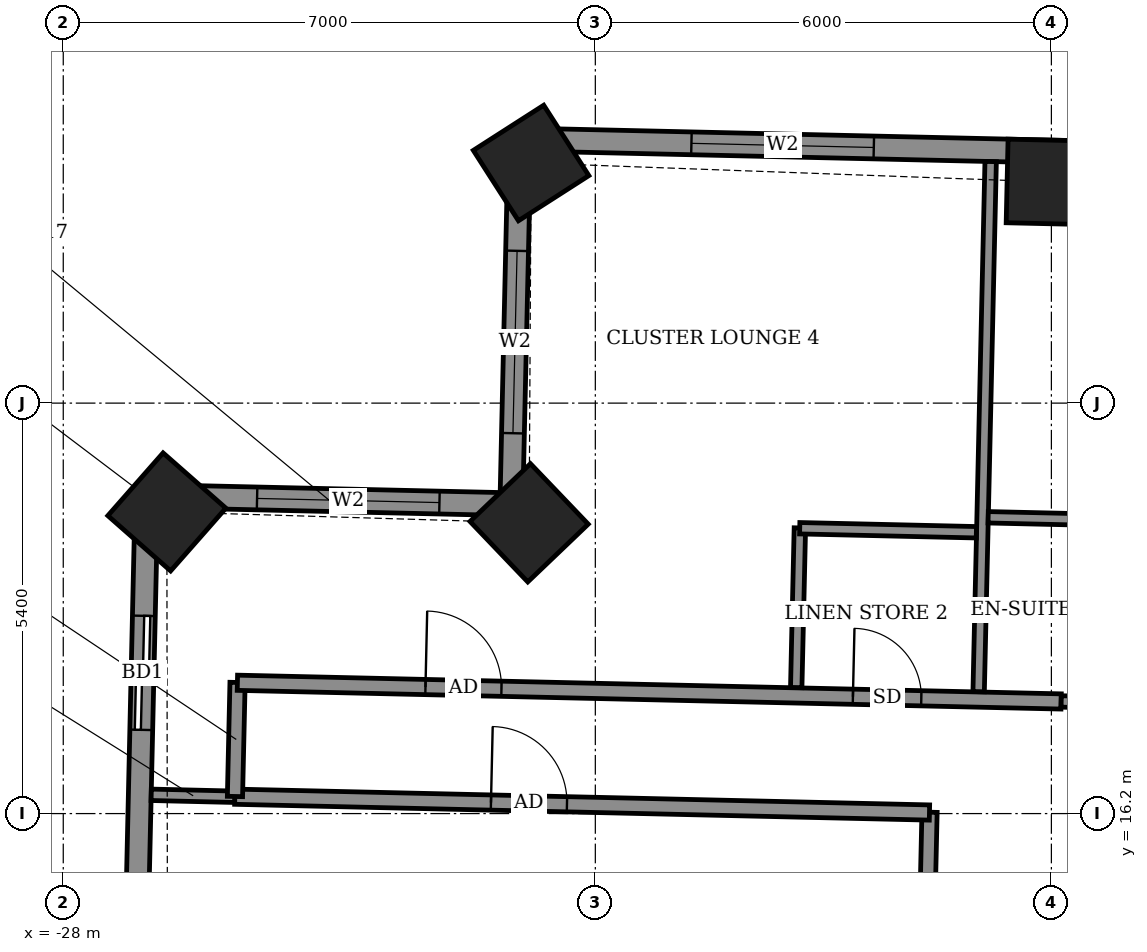
"""IFC4 building model, lengths in metres.
Left out: names, types, materials, properties, quantities, classifications, styles, units other than length and angle.
Written with IfcOpenShell. Run it as: python <this file> out.ifc"""

import sys

from ifc_helpers import new_model, si_unit, direction, frame, frame_2d, origin, origin_2d, place, context, subcontext, project, spatial, rectangle, extrude, element, fill, save


model = new_model("IFC4")
c1 = context("Model", 3, precision=1e-05, world=origin(), true_north=direction((0.0, 1.0)))
c2 = subcontext(c1, "Body", "Model", "MODEL_VIEW")
j1 = project(units=[si_unit("LENGTHUNIT", "METRE"), si_unit("PLANEANGLEUNIT", "RADIAN")], contexts=[c1])
p1 = place(None, origin())
s1 = spatial("IfcSite", under=j1, at=p1, CompositionType="ELEMENT")
p2 = place(p1, origin())
s2 = spatial("IfcBuilding", under=s1, at=p2, CompositionType="ELEMENT")
p3 = place(p2, frame((0.0, 0.0, 208.7)))
s3 = spatial("IfcBuildingStorey", under=s2, at=p3, CompositionType="ELEMENT", Elevation=208.7)
for number, where, z_axis, x_axis in (
    (1, (-15.032, 24.51, -0.55), (0.0, 0.0, 1.0), (-1.0, 0.023, 0.0)),
    (2, (-21.845, 24.759, -0.55), (0.0, 0.0, 1.0), (-0.842, -0.54, 0.0)),
    (3, (-21.871, 20.025, -0.55), (0.0, 0.0, 1.0), (-0.723, -0.691, 0.0)),
    (4, (-26.637, 20.169, -0.55), (0.0, 0.0, 1.0), (-0.661, -0.751, 0.0)),
):
    element("IfcColumn", number, at=place(p3, frame(where, z_axis=z_axis, x_axis=x_axis)), inside=s3, PredefinedType="COLUMN", context=c2, shape_type="SweptSolid", body=[
        extrude(rectangle(XDim=1.1, YDim=1.1, at=origin_2d()), origin(), (0.0, 0.0, 1.0), 3.6),
    ])
p4 = place(p3, frame((20.437, 24.106, 0.0), z_axis=(0.0, 0.0, 1.0), x_axis=(-0.999742506232, 0.022691875925, 0.0)))
e5 = element("IfcWall", 5, at=p4, inside=s3, PredefinedType="SOLIDWALL", context=c2, shape_type="SweptSolid", body=[
    extrude(rectangle(XDim=42.444, YDim=0.3, at=frame_2d((21.222, 0.0))), origin(), (0.0, 0.0, 1.0), 2.55),
])
p5 = place(p4, frame((1.563, 0.0, 0.0)))
e6 = element("IfcOpeningElement", 6, at=p5, cuts=e5, PredefinedType="OPENING", context=c2, shape_type="SweptSolid", body=[
    extrude(rectangle(XDim=1.5, YDim=2.4, at=frame_2d((0.75, 1.2))), frame((0.0, 0.16, 0.0), z_axis=(0.0, -1.0, 0.0), x_axis=(1.0, 0.0, 0.0)), (0.0, 0.0, 1.0), 0.32),
])
p6 = place(p4, frame((4.584, 0.0, 0.0)))
e7 = element("IfcOpeningElement", 7, at=p6, cuts=e5, PredefinedType="OPENING", context=c2, shape_type="SweptSolid", body=[
    extrude(rectangle(XDim=1.5, YDim=2.4, at=frame_2d((0.75, 1.2))), frame((0.0, 0.16, 0.0), z_axis=(0.0, -1.0, 0.0), x_axis=(1.0, 0.0, 0.0)), (0.0, 0.0, 1.0), 0.32),
])
p7 = place(p4, frame((10.269, 0.0, 0.0)))
e8 = element("IfcOpeningElement", 8, at=p7, cuts=e5, PredefinedType="OPENING", context=c2, shape_type="SweptSolid", body=[
    extrude(rectangle(XDim=1.5, YDim=2.4, at=frame_2d((0.75, 1.2))), frame((0.0, 0.16, 0.0), z_axis=(0.0, -1.0, 0.0), x_axis=(1.0, 0.0, 0.0)), (0.0, 0.0, 1.0), 0.32),
])
p8 = place(p4, frame((15.271, 0.0, 0.0)))
e9 = element("IfcOpeningElement", 9, at=p8, cuts=e5, PredefinedType="OPENING", context=c2, shape_type="SweptSolid", body=[
    extrude(rectangle(XDim=1.5, YDim=2.4, at=frame_2d((0.75, 1.2))), frame((0.0, 0.16, 0.0), z_axis=(0.0, -1.0, 0.0), x_axis=(1.0, 0.0, 0.0)), (0.0, 0.0, 1.0), 0.32),
])
p9 = place(p4, frame((18.533, 0.0, 0.0)))
e10 = element("IfcOpeningElement", 10, at=p9, cuts=e5, PredefinedType="OPENING", context=c2, shape_type="SweptSolid", body=[
    extrude(rectangle(XDim=1.5, YDim=2.4, at=frame_2d((0.75, 1.2))), frame((0.0, 0.16, 0.0), z_axis=(0.0, -1.0, 0.0), x_axis=(1.0, 0.0, 0.0)), (0.0, 0.0, 1.0), 0.32),
])
p10 = place(p4, frame((23.819, 0.0, 0.0)))
e11 = element("IfcOpeningElement", 11, at=p10, cuts=e5, PredefinedType="OPENING", context=c2, shape_type="SweptSolid", body=[
    extrude(rectangle(XDim=1.5, YDim=2.4, at=frame_2d((0.75, 1.2))), frame((0.0, 0.16, 0.0), z_axis=(0.0, -1.0, 0.0), x_axis=(1.0, 0.0, 0.0)), (0.0, 0.0, 1.0), 0.32),
])
p11 = place(p4, frame((29.345, 0.0, 0.0)))
e12 = element("IfcOpeningElement", 12, at=p11, cuts=e5, PredefinedType="OPENING", context=c2, shape_type="SweptSolid", body=[
    extrude(rectangle(XDim=1.5, YDim=2.4, at=frame_2d((0.75, 1.2))), frame((0.0, 0.16, 0.0), z_axis=(0.0, -1.0, 0.0), x_axis=(1.0, 0.0, 0.0)), (0.0, 0.0, 1.0), 0.32),
])
p12 = place(p4, frame((32.607, 0.0, 0.0)))
e13 = element("IfcOpeningElement", 13, at=p12, cuts=e5, PredefinedType="OPENING", context=c2, shape_type="SweptSolid", body=[
    extrude(rectangle(XDim=1.5, YDim=2.4, at=frame_2d((0.75, 1.2))), frame((0.0, 0.16, 0.0), z_axis=(0.0, -1.0, 0.0), x_axis=(1.0, 0.0, 0.0)), (0.0, 0.0, 1.0), 0.32),
])
p13 = place(p4, frame((37.783, 0.0, 0.9)))
e14 = element("IfcOpeningElement", 14, at=p13, cuts=e5, PredefinedType="OPENING", context=c2, shape_type="SweptSolid", body=[
    extrude(rectangle(XDim=2.4, YDim=1.5, at=frame_2d((1.2, 0.75))), frame((0.0, 0.16, 0.0), z_axis=(0.0, -1.0, 0.0), x_axis=(1.0, 0.0, 0.0)), (0.0, 0.0, 1.0), 0.32),
])
p14 = place(p3, frame((-21.996, 25.069, 0.0), z_axis=(0.0, 0.0, 1.0), x_axis=(-0.022683280499, -0.999742701292, 0.0)))
e15 = element("IfcWall", 15, at=p14, inside=s3, PredefinedType="SOLIDWALL", context=c2, shape_type="SweptSolid", body=[
    extrude(rectangle(XDim=4.8, YDim=0.3, at=frame_2d((2.4, 0.0))), origin(), (0.0, 0.0, 1.0), 2.55),
])
p15 = place(p14, frame((1.466, 0.0, 0.9)))
e16 = element("IfcOpeningElement", 16, at=p15, cuts=e15, PredefinedType="OPENING", context=c2, shape_type="SweptSolid", body=[
    extrude(rectangle(XDim=2.4, YDim=1.5, at=frame_2d((1.2, 0.75))), frame((0.0, 0.16, 0.0), z_axis=(0.0, -1.0, 0.0), x_axis=(1.0, 0.0, 0.0)), (0.0, 0.0, 1.0), 0.32),
])
p16 = place(p3, frame((-22.105, 20.27, 0.0), z_axis=(0.0, 0.0, 1.0), x_axis=(-0.999742701292, 0.022683280499, 0.0)))
e17 = element("IfcWall", 17, at=p16, inside=s3, PredefinedType="SOLIDWALL", context=c2, shape_type="SweptSolid", body=[
    extrude(rectangle(XDim=4.8, YDim=0.3, at=frame_2d((2.4, 0.0))), origin(), (0.0, 0.0, 1.0), 2.55),
])
p17 = place(p16, frame((0.946, 0.0, 0.9)))
e18 = element("IfcOpeningElement", 18, at=p17, cuts=e17, PredefinedType="OPENING", context=c2, shape_type="SweptSolid", body=[
    extrude(rectangle(XDim=2.4, YDim=1.5, at=frame_2d((1.2, 0.75))), frame((0.0, 0.16, 0.0), z_axis=(0.0, -1.0, 0.0), x_axis=(1.0, 0.0, 0.0)), (0.0, 0.0, 1.0), 0.32),
])
p18 = place(p3, frame((-26.904, 20.379, 0.0), z_axis=(0.0, 0.0, 1.0), x_axis=(-0.022671687694, -0.999742964255, 0.0)))
e19 = element("IfcWall", 19, at=p18, inside=s3, PredefinedType="SOLIDWALL", context=c2, shape_type="SweptSolid", body=[
    extrude(rectangle(XDim=11.824, YDim=0.3, at=frame_2d((5.912, 0.0))), origin(), (0.0, 0.0, 1.0), 2.55),
])
p19 = place(p18, frame((1.578, 0.0, 0.0)))
e20 = element("IfcOpeningElement", 20, at=p19, cuts=e19, PredefinedType="OPENING", context=c2, shape_type="SweptSolid", body=[
    extrude(rectangle(XDim=1.5, YDim=2.4, at=frame_2d((0.75, 1.2))), frame((0.0, 0.16, 0.0), z_axis=(0.0, -1.0, 0.0), x_axis=(1.0, 0.0, 0.0)), (0.0, 0.0, 1.0), 0.32),
])
p20 = place(p18, frame((7.218, 0.0, 0.9)))
e21 = element("IfcOpeningElement", 21, at=p20, cuts=e19, PredefinedType="OPENING", context=c2, shape_type="SweptSolid", body=[
    extrude(rectangle(XDim=2.4, YDim=1.5, at=frame_2d((1.2, 0.75))), frame((0.0, 0.16, 0.0), z_axis=(0.0, -1.0, 0.0), x_axis=(1.0, 0.0, 0.0)), (0.0, 0.0, 1.0), 0.32),
])
p21 = place(p3, frame((-17.247, -12.149, 0.0), z_axis=(0.0, 0.0, 1.0), x_axis=(0.022698146637, 0.999742363881, 0.0)))
e22 = element("IfcWall", 22, at=p21, inside=s3, PredefinedType="PARTITIONING", context=c2, shape_type="SweptSolid", body=[
    extrude(rectangle(XDim=28.374, YDim=0.2, at=frame_2d((14.187, 0.0))), origin(), (0.0, 0.0, 1.0), 3.05),
])
p22 = place(p21, frame((17.225, 0.0, 0.0)))
e23 = element("IfcOpeningElement", 23, at=p22, cuts=e22, PredefinedType="OPENING", context=c2, shape_type="SweptSolid", body=[
    extrude(rectangle(XDim=1.0, YDim=2.1, at=frame_2d((0.5, 1.05))), frame((0.0, 0.11, 0.0), z_axis=(0.0, -1.0, 0.0), x_axis=(1.0, 0.0, 0.0)), (0.0, 0.0, 1.0), 0.22),
])
p23 = place(p21, frame((19.375, 0.0, 0.0)))
e24 = element("IfcOpeningElement", 24, at=p23, cuts=e22, PredefinedType="OPENING", context=c2, shape_type="SweptSolid", body=[
    extrude(rectangle(XDim=0.9, YDim=2.1, at=frame_2d((0.45, 1.05))), frame((0.0, 0.11, 0.0), z_axis=(0.0, -1.0, 0.0), x_axis=(1.0, 0.0, 0.0)), (0.0, 0.0, 1.0), 0.22),
])
p24 = place(p21, frame((13.822, 0.0, 0.0)))
e25 = element("IfcOpeningElement", 25, at=p24, cuts=e22, PredefinedType="OPENING", context=c2, shape_type="SweptSolid", body=[
    extrude(rectangle(XDim=1.0, YDim=2.1, at=frame_2d((0.5, 1.05))), frame((0.0, 0.11, 0.0), z_axis=(0.0, -1.0, 0.0), x_axis=(1.0, 0.0, 0.0)), (0.0, 0.0, 1.0), 0.22),
])
p25 = place(p21, frame((10.25, 0.0, 0.0)))
e26 = element("IfcOpeningElement", 26, at=p25, cuts=e22, PredefinedType="OPENING", context=c2, shape_type="SweptSolid", body=[
    extrude(rectangle(XDim=1.0, YDim=2.1, at=frame_2d((0.5, 1.05))), frame((0.0, 0.11, 0.0), z_axis=(0.0, -1.0, 0.0), x_axis=(1.0, 0.0, 0.0)), (0.0, 0.0, 1.0), 0.22),
])
p26 = place(p21, frame((8.025, 0.0, 0.0)))
e27 = element("IfcOpeningElement", 27, at=p26, cuts=e22, PredefinedType="OPENING", context=c2, shape_type="SweptSolid", body=[
    extrude(rectangle(XDim=0.9, YDim=2.1, at=frame_2d((0.45, 1.05))), frame((0.0, 0.11, 0.0), z_axis=(0.0, -1.0, 0.0), x_axis=(1.0, 0.0, 0.0)), (0.0, 0.0, 1.0), 0.22),
])
p27 = place(p21, frame((5.262, 0.0, 0.0)))
e28 = element("IfcOpeningElement", 28, at=p27, cuts=e22, PredefinedType="OPENING", context=c2, shape_type="SweptSolid", body=[
    extrude(rectangle(XDim=1.0, YDim=2.1, at=frame_2d((0.5, 1.05))), frame((0.0, 0.11, 0.0), z_axis=(0.0, -1.0, 0.0), x_axis=(1.0, 0.0, 0.0)), (0.0, 0.0, 1.0), 0.22),
])
p28 = place(p21, frame((2.825, 0.0, 0.0)))
e29 = element("IfcOpeningElement", 29, at=p28, cuts=e22, PredefinedType="OPENING", context=c2, shape_type="SweptSolid", body=[
    extrude(rectangle(XDim=1.0, YDim=2.1, at=frame_2d((0.5, 1.05))), frame((0.0, 0.11, 0.0), z_axis=(0.0, -1.0, 0.0), x_axis=(1.0, 0.0, 0.0)), (0.0, 0.0, 1.0), 0.22),
])
p29 = place(p21, frame((0.75, 0.0, 0.0)))
e30 = element("IfcOpeningElement", 30, at=p29, cuts=e22, PredefinedType="OPENING", context=c2, shape_type="SweptSolid", body=[
    extrude(rectangle(XDim=0.9, YDim=2.1, at=frame_2d((0.45, 1.05))), frame((0.0, 0.11, 0.0), z_axis=(0.0, -1.0, 0.0), x_axis=(1.0, 0.0, 0.0)), (0.0, 0.0, 1.0), 0.22),
])
p30 = place(p3, frame((-26.843, 16.447, 0.0), z_axis=(0.0, 0.0, 1.0), x_axis=(0.999720170098, -0.023655475055, 0.0)))
e31 = element("IfcWall", 31, at=p30, inside=s3, PredefinedType="PARTITIONING", context=c2, shape_type="SweptSolid", body=[
    extrude(rectangle(XDim=1.104, YDim=0.15, at=frame_2d((0.552, 0.0))), origin(), (0.0, 0.0, 1.0), 2.55),
])
p31 = place(p3, frame((-25.743, 16.422, 0.0), z_axis=(0.0, 0.0, 1.0), x_axis=(0.999741076645, -0.022754772455, 0.0)))
e32 = element("IfcWall", 32, at=p31, inside=s3, PredefinedType="PARTITIONING", context=c2, shape_type="SweptSolid", body=[
    extrude(rectangle(XDim=9.141, YDim=0.2, at=frame_2d((4.571, 0.0))), origin(), (0.0, 0.0, 1.0), 3.05),
])
p32 = place(p31, frame((3.371, 0.0, 0.0)))
e33 = element("IfcOpeningElement", 33, at=p32, cuts=e32, PredefinedType="OPENING", context=c2, shape_type="SweptSolid", body=[
    extrude(rectangle(XDim=1.0, YDim=2.1, at=frame_2d((0.5, 1.05))), frame((0.0, 0.11, 0.0), z_axis=(0.0, -1.0, 0.0), x_axis=(1.0, 0.0, 0.0)), (0.0, 0.0, 1.0), 0.22),
])
p33 = place(p3, frame((-25.741, 16.425, 0.0), z_axis=(0.0, 0.0, 1.0), x_axis=(0.022617910375, 0.999744182344, 0.0)))
e34 = element("IfcWall", 34, at=p33, inside=s3, PredefinedType="PARTITIONING", context=c2, shape_type="SweptSolid", body=[
    extrude(rectangle(XDim=1.5, YDim=0.2, at=frame_2d((0.75, 0.0))), origin(), (0.0, 0.0, 1.0), 3.05),
])
p34 = place(p3, frame((-25.709, 17.921, 0.0), z_axis=(0.0, 0.0, 1.0), x_axis=(0.999742764922, -0.022680475901, 0.0)))
e35 = element("IfcWall", 35, at=p34, inside=s3, PredefinedType="PARTITIONING", context=c2, shape_type="SweptSolid", body=[
    extrude(rectangle(XDim=10.84, YDim=0.2, at=frame_2d((5.42, 0.0))), origin(), (0.0, 0.0, 1.0), 3.05),
])
p35 = place(p34, frame((2.475, 0.0, 0.0)))
e36 = element("IfcOpeningElement", 36, at=p35, cuts=e35, PredefinedType="OPENING", context=c2, shape_type="SweptSolid", body=[
    extrude(rectangle(XDim=1.0, YDim=2.1, at=frame_2d((0.5, 1.05))), frame((0.0, 0.11, 0.0), z_axis=(0.0, -1.0, 0.0), x_axis=(1.0, 0.0, 0.0)), (0.0, 0.0, 1.0), 0.22),
])
p36 = place(p34, frame((8.1, 0.0, 0.0)))
e37 = element("IfcOpeningElement", 37, at=p36, cuts=e35, PredefinedType="OPENING", context=c2, shape_type="SweptSolid", body=[
    extrude(rectangle(XDim=0.9, YDim=2.1, at=frame_2d((0.45, 1.05))), frame((0.0, 0.11, 0.0), z_axis=(0.0, -1.0, 0.0), x_axis=(1.0, 0.0, 0.0)), (0.0, 0.0, 1.0), 0.22),
])
p37 = place(p3, frame((-14.871, 17.675, 0.0), z_axis=(0.0, 0.0, 1.0), x_axis=(0.999742359486, -0.02269834024, 0.0)))
e38 = element("IfcWall", 38, at=p37, inside=s3, PredefinedType="PARTITIONING", context=c2, shape_type="SweptSolid", body=[
    extrude(rectangle(XDim=30.536, YDim=0.15, at=frame_2d((15.268, 0.0))), origin(), (0.0, 0.0, 1.0), 3.05),
])
p38 = place(p37, frame((29.436, 0.0, 0.0)))
e39 = element("IfcOpeningElement", 39, at=p38, cuts=e38, PredefinedType="OPENING", context=c2, shape_type="SweptSolid", body=[
    extrude(rectangle(XDim=0.9, YDim=2.1, at=frame_2d((0.45, 1.05))), frame((0.0, 0.085, 0.0), z_axis=(0.0, -1.0, 0.0), x_axis=(1.0, 0.0, 0.0)), (0.0, 0.0, 1.0), 0.17),
])
p39 = place(p37, frame((22.484, 0.0, 0.0)))
e40 = element("IfcOpeningElement", 40, at=p39, cuts=e38, PredefinedType="OPENING", context=c2, shape_type="SweptSolid", body=[
    extrude(rectangle(XDim=0.9, YDim=2.1, at=frame_2d((0.45, 1.05))), frame((0.0, 0.085, 0.0), z_axis=(0.0, -1.0, 0.0), x_axis=(1.0, 0.0, 0.0)), (0.0, 0.0, 1.0), 0.17),
])
p40 = place(p37, frame((20.434, 0.0, 0.0)))
e41 = element("IfcOpeningElement", 41, at=p40, cuts=e38, PredefinedType="OPENING", context=c2, shape_type="SweptSolid", body=[
    extrude(rectangle(XDim=0.9, YDim=2.1, at=frame_2d((0.45, 1.05))), frame((0.0, 0.085, 0.0), z_axis=(0.0, -1.0, 0.0), x_axis=(1.0, 0.0, 0.0)), (0.0, 0.0, 1.0), 0.17),
])
p41 = place(p37, frame((13.484, 0.0, 0.0)))
e42 = element("IfcOpeningElement", 42, at=p41, cuts=e38, PredefinedType="OPENING", context=c2, shape_type="SweptSolid", body=[
    extrude(rectangle(XDim=0.9, YDim=2.1, at=frame_2d((0.45, 1.05))), frame((0.0, 0.085, 0.0), z_axis=(0.0, -1.0, 0.0), x_axis=(1.0, 0.0, 0.0)), (0.0, 0.0, 1.0), 0.17),
])
p42 = place(p37, frame((11.334, 0.0, 0.0)))
e43 = element("IfcOpeningElement", 43, at=p42, cuts=e38, PredefinedType="OPENING", context=c2, shape_type="SweptSolid", body=[
    extrude(rectangle(XDim=0.9, YDim=2.1, at=frame_2d((0.45, 1.05))), frame((0.0, 0.085, 0.0), z_axis=(0.0, -1.0, 0.0), x_axis=(1.0, 0.0, 0.0)), (0.0, 0.0, 1.0), 0.17),
])
p43 = place(p37, frame((4.359, 0.0, 0.0)))
e44 = element("IfcOpeningElement", 44, at=p43, cuts=e38, PredefinedType="OPENING", context=c2, shape_type="SweptSolid", body=[
    extrude(rectangle(XDim=0.9, YDim=2.1, at=frame_2d((0.45, 1.05))), frame((0.0, 0.085, 0.0), z_axis=(0.0, -1.0, 0.0), x_axis=(1.0, 0.0, 0.0)), (0.0, 0.0, 1.0), 0.17),
])
p44 = place(p37, frame((2.009, 0.0, 0.0)))
e45 = element("IfcOpeningElement", 45, at=p44, cuts=e38, PredefinedType="OPENING", context=c2, shape_type="SweptSolid", body=[
    extrude(rectangle(XDim=0.9, YDim=2.1, at=frame_2d((0.45, 1.05))), frame((0.0, 0.085, 0.0), z_axis=(0.0, -1.0, 0.0), x_axis=(1.0, 0.0, 0.0)), (0.0, 0.0, 1.0), 0.17),
])
p45 = place(p3, frame((-18.357, 17.858, 0.0), z_axis=(0.0, 0.0, 1.0), x_axis=(0.022779486249, 0.999740513837, 0.0)))
e46 = element("IfcWall", 46, at=p45, inside=s3, PredefinedType="PARTITIONING", context=c2, shape_type="SweptSolid", body=[
    extrude(rectangle(XDim=2.101, YDim=0.15, at=frame_2d((1.05, 0.0))), origin(), (0.0, 0.0, 1.0), 3.05),
])
p46 = place(p3, frame((-15.957, 17.804, 0.0), z_axis=(0.0, 0.0, 1.0), x_axis=(0.022643496158, 0.999743603171, 0.0)))
e47 = element("IfcWall", 47, at=p46, inside=s3, PredefinedType="PARTITIONING", context=c2, shape_type="SweptSolid", body=[
    extrude(rectangle(XDim=6.976, YDim=0.15, at=frame_2d((3.488, 0.0))), origin(), (0.0, 0.0, 1.0), 2.55),
])
for number, where, z_axis, x_axis in (
    (48, (-18.311, 19.954, 0.0), (0.0, 0.0, 1.0), (1.0, -0.023, 0.0)),
    (49, (-15.832, 20.098, 0.0), (0.0, 0.0, 1.0), (1.0, -0.023, 0.0)),
):
    element("IfcWall", number, at=place(p3, frame(where, z_axis=z_axis, x_axis=x_axis)), inside=s3, PredefinedType="PARTITIONING", context=c2, shape_type="SweptSolid", body=[
        extrude(rectangle(XDim=2.324, YDim=0.15, at=frame_2d((1.162, 0.0))), origin(), (0.0, 0.0, 1.0), 3.05),
    ])
p47 = place(p13, origin())
e50 = element("IfcWindow", 50, at=p47, inside=s3, PartitioningType="DOUBLE_PANEL_VERTICAL", PredefinedType="WINDOW", context=c2, shape_type="SweptSolid", body=[
    extrude(rectangle(XDim=2.4, YDim=1.5, at=frame_2d((1.2, 0.75))), frame((0.0, 0.03, 0.0), z_axis=(0.0, -1.0, 0.0), x_axis=(1.0, 0.0, 0.0)), (0.0, 0.0, 1.0), 0.06),
])
fill(e14, e50)
p48 = place(p15, origin())
e51 = element("IfcWindow", 51, at=p48, inside=s3, PartitioningType="DOUBLE_PANEL_VERTICAL", PredefinedType="WINDOW", context=c2, shape_type="SweptSolid", body=[
    extrude(rectangle(XDim=2.4, YDim=1.5, at=frame_2d((1.2, 0.75))), frame((0.0, 0.03, 0.0), z_axis=(0.0, -1.0, 0.0), x_axis=(1.0, 0.0, 0.0)), (0.0, 0.0, 1.0), 0.06),
])
fill(e16, e51)
p49 = place(p17, origin())
e52 = element("IfcWindow", 52, at=p49, inside=s3, PartitioningType="DOUBLE_PANEL_VERTICAL", PredefinedType="WINDOW", context=c2, shape_type="SweptSolid", body=[
    extrude(rectangle(XDim=2.4, YDim=1.5, at=frame_2d((1.2, 0.75))), frame((0.0, 0.03, 0.0), z_axis=(0.0, -1.0, 0.0), x_axis=(1.0, 0.0, 0.0)), (0.0, 0.0, 1.0), 0.06),
])
fill(e18, e52)
p50 = place(p19, origin())
e53 = element("IfcDoor", 53, at=p50, inside=s3, OperationType="SLIDING_TO_LEFT", PredefinedType="DOOR", context=c2, shape_type="SweptSolid", body=[
    extrude(rectangle(XDim=1.5, YDim=2.4, at=frame_2d((0.75, 1.2))), frame((0.0, 0.025, 0.0), z_axis=(0.0, -1.0, 0.0), x_axis=(1.0, 0.0, 0.0)), (0.0, 0.0, 1.0), 0.05),
])
fill(e20, e53)
p51 = place(p35, origin())
e54 = element("IfcDoor", 54, at=p51, inside=s3, OperationType="SINGLE_SWING_RIGHT", PredefinedType="DOOR", context=c2, shape_type="SweptSolid", body=[
    extrude(rectangle(XDim=1.0, YDim=2.1, at=frame_2d((0.5, 1.05))), frame((0.0, 0.025, 0.0), z_axis=(0.0, -1.0, 0.0), x_axis=(1.0, 0.0, 0.0)), (0.0, 0.0, 1.0), 0.05),
])
fill(e36, e54)
p52 = place(p36, origin())
e55 = element("IfcDoor", 55, at=p52, inside=s3, OperationType="SINGLE_SWING_LEFT", PredefinedType="DOOR", context=c2, shape_type="SweptSolid", body=[
    extrude(rectangle(XDim=0.9, YDim=2.1, at=frame_2d((0.45, 1.05))), frame((0.0, 0.025, 0.0), z_axis=(0.0, -1.0, 0.0), x_axis=(1.0, 0.0, 0.0)), (0.0, 0.0, 1.0), 0.05),
])
fill(e37, e55)
p53 = place(p32, origin())
e56 = element("IfcDoor", 56, at=p53, inside=s3, OperationType="SINGLE_SWING_LEFT", PredefinedType="DOOR", context=c2, shape_type="SweptSolid", body=[
    extrude(rectangle(XDim=1.0, YDim=2.1, at=frame_2d((0.5, 1.05))), frame((0.0, 0.025, 0.0), z_axis=(0.0, -1.0, 0.0), x_axis=(1.0, 0.0, 0.0)), (0.0, 0.0, 1.0), 0.05),
])
fill(e33, e56)
save(model, sys.argv[1])
